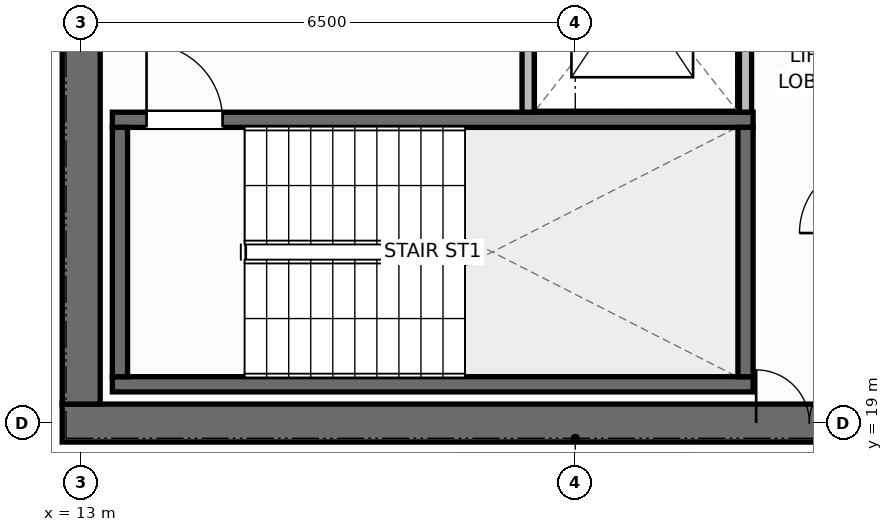
"""IFC4 building model, lengths in metres.
Left out: names, types, materials, properties, quantities, classifications, styles, units other than length and angle.
Written with IfcOpenShell. Run it as: python <this file> out.ifc"""

import sys

from ifc_helpers import new_model, si_unit, direction, frame, frame_2d, origin, place, context, subcontext, project, spatial, rectangle, extrude, element, fill, save


model = new_model("IFC4")
c1 = context("Model", 3, precision=1e-05, world=origin(), true_north=direction((0.0, 1.0)))
c2 = subcontext(c1, "Body", "Model", "MODEL_VIEW")
j1 = project(units=[si_unit("LENGTHUNIT", "METRE"), si_unit("PLANEANGLEUNIT", "RADIAN")], contexts=[c1])
p1 = place(None, origin())
s1 = spatial("IfcSite", under=j1, at=p1, CompositionType="ELEMENT")
p2 = place(p1, origin())
s2 = spatial("IfcBuilding", under=s1, at=p2, CompositionType="ELEMENT")
p3 = place(p2, frame((0.0, 0.0, 255.6)))
s3 = spatial("IfcBuildingStorey", under=s2, at=p3, CompositionType="ELEMENT", Elevation=255.6)
p4 = place(p3, frame((12.75, 19.0, 0.0), z_axis=(0.0, 0.0, 1.0), x_axis=(1.0, 0.0, 0.0)))
e1 = element("IfcWall", 1, at=p4, inside=s3, PredefinedType="SHEAR", context=c2, shape_type="SweptSolid", body=[
    extrude(rectangle(XDim=13.5, YDim=0.5, at=frame_2d((6.75, 0.0))), origin(), (0.0, 0.0, 1.0), 3.8),
])
p5 = place(p4, frame((9.13, 0.0, 0.0)))
e2 = element("IfcOpeningElement", 2, at=p5, cuts=e1, PredefinedType="OPENING", context=c2, shape_type="SweptSolid", body=[
    extrude(rectangle(XDim=1.4, YDim=2.2, at=frame_2d((0.7, 1.1))), frame((0.0, 0.26, 0.0), z_axis=(0.0, -1.0, 0.0), x_axis=(1.0, 0.0, 0.0)), (0.0, 0.0, 1.0), 0.52),
])
p6 = place(p3, frame((13.0, 19.25, 0.0), z_axis=(0.0, 0.0, 1.0), x_axis=(0.0, 1.0, 0.0)))
e3 = element("IfcWall", 3, at=p6, inside=s3, PredefinedType="SHEAR", context=c2, shape_type="SweptSolid", body=[
    extrude(rectangle(XDim=13.5, YDim=0.5, at=frame_2d((6.75, 0.0))), origin(), (0.0, 0.0, 1.0), 3.8),
])
p7 = place(p6, frame((4.8, 0.0, 0.0)))
e4 = element("IfcOpeningElement", 4, at=p7, cuts=e3, PredefinedType="OPENING", context=c2, shape_type="SweptSolid", body=[
    extrude(rectangle(XDim=1.4, YDim=2.2, at=frame_2d((0.7, 1.1))), frame((0.0, 0.26, 0.0), z_axis=(0.0, -1.0, 0.0), x_axis=(1.0, 0.0, 0.0)), (0.0, 0.0, 1.0), 0.52),
])
p8 = place(p3, frame((13.41, 19.51, 0.0), z_axis=(0.0, 0.0, 1.0), x_axis=(1.0, 0.0, 0.0)))
e5 = element("IfcWall", 5, at=p8, inside=s3, PredefinedType="SHEAR", context=c2, shape_type="SweptSolid", body=[
    extrude(rectangle(XDim=8.43, YDim=0.2, at=frame_2d((4.215, 0.0))), origin(), (0.0, 0.0, 1.0), 3.8),
])
p9 = place(p3, frame((13.41, 22.99, 0.0), z_axis=(0.0, 0.0, 1.0), x_axis=(1.0, 0.0, 0.0)))
e6 = element("IfcWall", 6, at=p9, inside=s3, PredefinedType="SHEAR", context=c2, shape_type="SweptSolid", body=[
    extrude(rectangle(XDim=8.43, YDim=0.2, at=frame_2d((4.215, 0.0))), origin(), (0.0, 0.0, 1.0), 3.8),
])
p10 = place(p9, frame((0.45, 0.0, 0.0)))
e7 = element("IfcOpeningElement", 7, at=p10, cuts=e6, PredefinedType="OPENING", context=c2, shape_type="SweptSolid", body=[
    extrude(rectangle(XDim=1.0, YDim=2.15, at=frame_2d((0.5, 1.075))), frame((0.0, 0.11, 0.0), z_axis=(0.0, -1.0, 0.0), x_axis=(1.0, 0.0, 0.0)), (0.0, 0.0, 1.0), 0.22),
])
for number, where, z_axis, x_axis in (
    (8, (13.51, 19.61, 0.0), (0.0, 0.0, 1.0), (0.0, 1.0, 0.0)),
    (9, (21.74, 19.61, 0.0), (0.0, 0.0, 1.0), (0.0, 1.0, 0.0)),
):
    element("IfcWall", number, at=place(p3, frame(where, z_axis=z_axis, x_axis=x_axis)), inside=s3, PredefinedType="SHEAR", context=c2, shape_type="SweptSolid", body=[
        extrude(rectangle(XDim=3.28, YDim=0.2, at=frame_2d((1.64, 0.0))), origin(), (0.0, 0.0, 1.0), 3.8),
    ])
p11 = place(p3, frame((21.74, 23.09, 0.0), z_axis=(0.0, 0.0, 1.0), x_axis=(0.0, 1.0, 0.0)))
e10 = element("IfcWall", 10, at=p11, inside=s3, PredefinedType="STANDARD", context=c2, shape_type="SweptSolid", body=[
    extrude(rectangle(XDim=3.47, YDim=0.16, at=frame_2d((1.735, 0.0))), origin(), (0.0, 0.0, 1.0), 3.588),
])
p12 = place(p3, frame((18.88, 23.09, 0.0), z_axis=(0.0, 0.0, 1.0), x_axis=(0.0, 1.0, 0.0)))
e11 = element("IfcWall", 11, at=p12, inside=s3, PredefinedType="STANDARD", context=c2, shape_type="SweptSolid", body=[
    extrude(rectangle(XDim=3.47, YDim=0.16, at=frame_2d((1.735, 0.0))), origin(), (0.0, 0.0, 1.0), 3.588),
])
p13 = place(p12, frame((1.1, 0.0, 0.0)))
e12 = element("IfcOpeningElement", 12, at=p13, cuts=e11, PredefinedType="OPENING", context=c2, shape_type="SweptSolid", body=[
    extrude(rectangle(XDim=1.1, YDim=2.2, at=frame_2d((0.55, 1.1))), frame((0.0, 0.09, 0.0), z_axis=(0.0, -1.0, 0.0), x_axis=(1.0, 0.0, 0.0)), (0.0, 0.0, 1.0), 0.18),
])
p14 = place(p10, origin())
e13 = element("IfcDoor", 13, at=p14, inside=s3, OperationType="SINGLE_SWING_LEFT", PredefinedType="DOOR", context=c2, shape_type="SweptSolid", body=[
    extrude(rectangle(XDim=1.0, YDim=2.15, at=frame_2d((0.5, 1.075))), frame((0.0, 0.025, 0.0), z_axis=(0.0, -1.0, 0.0), x_axis=(1.0, 0.0, 0.0)), (0.0, 0.0, 1.0), 0.05),
])
fill(e7, e13)
p15 = place(p5, origin())
e14 = element("IfcDoor", 14, at=p15, inside=s3, OperationType="DOUBLE_DOOR_SINGLE_SWING", PredefinedType="DOOR", context=c2, shape_type="SweptSolid", body=[
    extrude(rectangle(XDim=1.4, YDim=2.2, at=frame_2d((0.7, 1.1))), frame((0.0, 0.075, 0.0), z_axis=(0.0, -1.0, 0.0), x_axis=(1.0, 0.0, 0.0)), (0.0, 0.0, 1.0), 0.05),
])
fill(e2, e14)
save(model, sys.argv[1])
